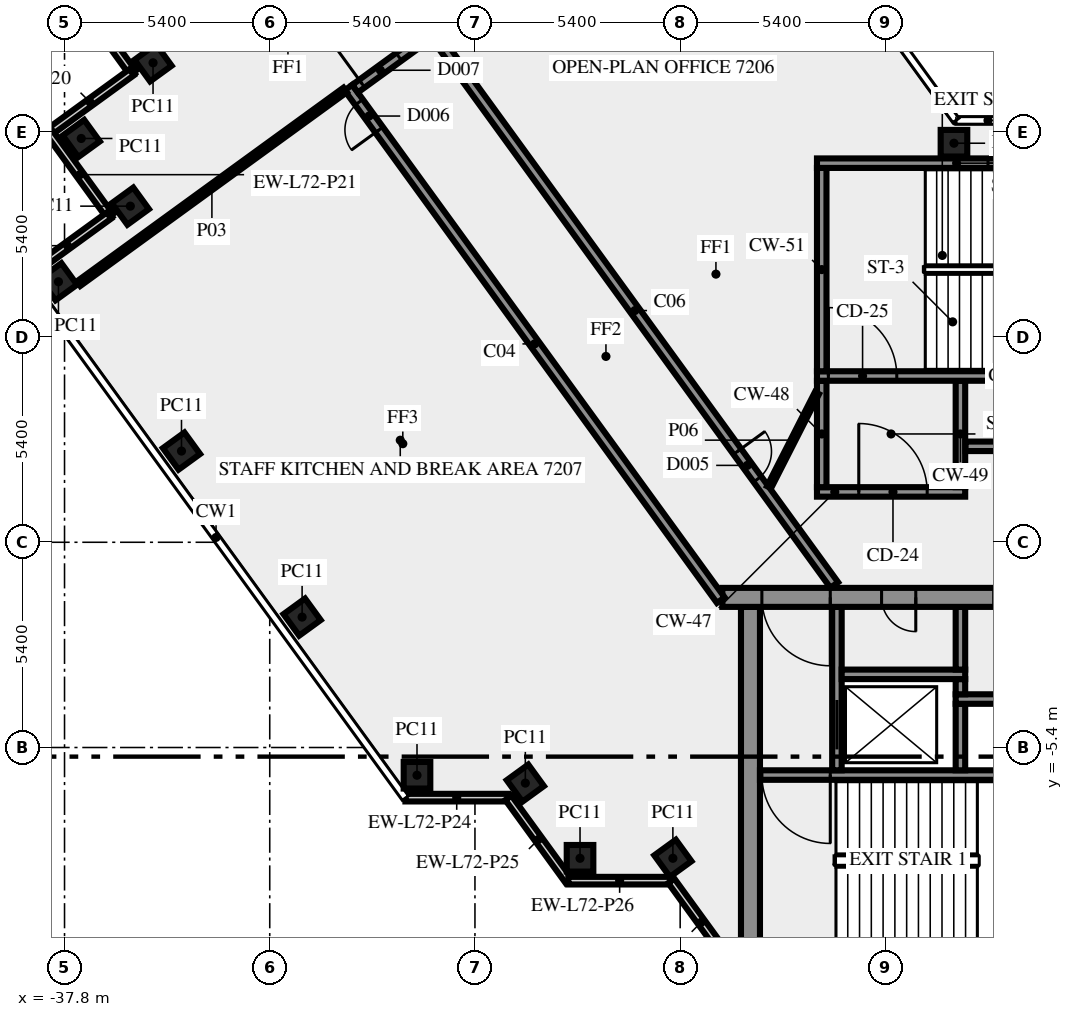
"""IFC4 building model, lengths in metres.
Left out: names, types, materials, properties, quantities, classifications, styles, units other than length and angle.
Written with IfcOpenShell. Run it as: python <this file> out.ifc"""

import sys

from ifc_helpers import new_model, si_unit, direction, frame, frame_2d, origin, origin_2d, place, context, subcontext, project, spatial, rectangle, extrude, element, fill, save


model = new_model("IFC4")
c1 = context("Model", 3, precision=1e-05, world=origin(), true_north=direction((0.0, 1.0)))
c2 = subcontext(c1, "Body", "Model", "MODEL_VIEW")
j1 = project(units=[si_unit("LENGTHUNIT", "METRE"), si_unit("PLANEANGLEUNIT", "RADIAN")], contexts=[c1])
p1 = place(None, origin())
s1 = spatial("IfcSite", under=j1, at=p1, CompositionType="ELEMENT")
p2 = place(p1, origin())
s2 = spatial("IfcBuilding", under=s1, at=p2, CompositionType="ELEMENT")
p3 = place(p2, frame((0.0, 0.0, 311.0)))
s3 = spatial("IfcBuildingStorey", under=s2, at=p3, CompositionType="ELEMENT", Elevation=311.0)
for number, where, z_axis, x_axis in (
    (1, (-35.471, 12.616, 0.0), (0.0, 0.0, 1.0), (-0.809, -0.588, 0.0)),
    (2, (-37.36, 10.625, 0.0), (0.0, 0.0, 1.0), (0.588, -0.809, 0.0)),
    (3, (-36.068, 8.844, 0.0), (0.0, 0.0, 1.0), (0.588, -0.809, 0.0)),
    (4, (-37.96, 6.855, 0.0), (0.0, 0.0, 1.0), (0.588, -0.809, 0.0)),
    (5, (-34.722, 2.4, 0.0), (0.0, 0.0, 1.0), (0.588, -0.809, 0.0)),
    (6, (-31.548, -1.969, 0.0), (0.0, 0.0, 1.0), (0.588, -0.809, 0.0)),
    (7, (-28.525, -6.13, 0.0), (0.0, 0.0, 1.0), (1.0, 0.0, 0.0)),
    (8, (-25.674, -6.337, 0.0), (0.0, 0.0, 1.0), (0.588, -0.809, 0.0)),
    (9, (-24.235, -8.315, 0.0), (0.0, 0.0, 1.0), (1.0, 0.0, 0.0)),
    (10, (-21.792, -8.315, 0.0), (0.0, 0.0, 1.0), (0.588, -0.809, 0.0)),
    (11, (-14.395, 10.5, 0.0), (0.0, 0.0, 1.0), (-1.0, 0.0, 0.0)),
):
    element("IfcColumn", number, at=place(p3, frame(where, z_axis=z_axis, x_axis=x_axis)), inside=s3, PredefinedType="COLUMN", context=c2, shape_type="SweptSolid", body=[
        extrude(rectangle(XDim=0.7, YDim=0.7, at=origin_2d()), origin(), (0.0, 0.0, 1.0), 3.65),
    ])
for number, where, z_axis, x_axis in (
    (12, (-37.592, 14.536, 0.0), (0.0, 0.0, 1.0), (0.588, -0.809, 0.0)),
    (13, (-36.032, 12.369, 0.0), (0.0, 0.0, 1.0), (-0.809, -0.588, 0.0)),
    (14, (-38.189, 10.765, 0.0), (0.0, 0.0, 1.0), (0.588, -0.809, 0.0)),
    (15, (-36.629, 8.597, 0.0), (0.0, 0.0, 1.0), (-0.809, -0.588, 0.0)),
    (16, (-28.83, -6.719, 0.0), (0.0, 0.0, 1.0), (1.0, 0.0, 0.0)),
):
    element("IfcWall", number, at=place(p3, frame(where, z_axis=z_axis, x_axis=x_axis)), inside=s3, PredefinedType="SOLIDWALL", context=c2, shape_type="SweptSolid", body=[
        extrude(rectangle(XDim=2.7, YDim=0.2, at=frame_2d((1.35, 0.0))), origin(), (0.0, 0.0, 1.0), 3.65),
    ])
p4 = place(p3, frame((-26.12, -6.724, 0.0), z_axis=(0.0, 0.0, 1.0), x_axis=(0.587720002413, -0.809064397168, 0.0)))
e17 = element("IfcWall", 17, at=p4, inside=s3, PredefinedType="SOLIDWALL", context=c2, shape_type="SweptSolid", body=[
    extrude(rectangle(XDim=2.7, YDim=0.2, at=frame_2d((1.35, 0.0))), origin(), (0.0, 0.0, 1.0), 3.65),
])
p5 = place(p3, frame((-24.543, -8.904, 0.0), z_axis=(0.0, 0.0, 1.0), x_axis=(1.0, 0.0, 0.0)))
e18 = element("IfcWall", 18, at=p5, inside=s3, PredefinedType="SOLIDWALL", context=c2, shape_type="SweptSolid", body=[
    extrude(rectangle(XDim=2.7, YDim=0.2, at=frame_2d((1.35, 0.0))), origin(), (0.0, 0.0, 1.0), 3.65),
])
p6 = place(p3, frame((-21.833, -8.909, 0.0), z_axis=(0.0, 0.0, 1.0), x_axis=(0.587766567315, -0.809030569476, 0.0)))
e19 = element("IfcWall", 19, at=p6, inside=s3, PredefinedType="SOLIDWALL", context=c2, shape_type="SweptSolid", body=[
    extrude(rectangle(XDim=2.688, YDim=0.2, at=frame_2d((1.344, 0.0))), origin(), (0.0, 0.0, 1.0), 3.65),
])
p7 = place(p3, frame((-19.75, -10.5, 0.0), z_axis=(0.0, 0.0, 1.0), x_axis=(0.0, 1.0, 0.0)))
e20 = element("IfcWall", 20, at=p7, inside=s3, PredefinedType="SHEAR", context=c2, shape_type="SweptSolid", body=[
    extrude(rectangle(XDim=8.8, YDim=0.5, at=frame_2d((4.4, 0.0))), origin(), (0.0, 0.0, 1.0), 3.65),
])
p8 = place(p3, frame((-11.45, -6.125, 0.0), z_axis=(0.0, 0.0, 1.0), x_axis=(-1.0, 0.0, 0.0)))
e21 = element("IfcWall", 21, at=p8, inside=s3, PredefinedType="SHEAR", context=c2, shape_type="SweptSolid", body=[
    extrude(rectangle(XDim=8.05, YDim=0.25, at=frame_2d((4.025, 0.0))), origin(), (0.0, 0.0, 1.0), 3.65),
])
p9 = place(p8, frame((6.2, 0.0, 0.0)))
e22 = element("IfcOpeningElement", 22, at=p9, cuts=e21, PredefinedType="OPENING", context=c2, shape_type="SweptSolid", body=[
    extrude(rectangle(XDim=1.8, YDim=2.1, at=frame_2d((0.9, 1.05))), frame((0.0, 0.135, 0.0), z_axis=(0.0, -1.0, 0.0), x_axis=(1.0, 0.0, 0.0)), (0.0, 0.0, 1.0), 0.27),
])
p10 = place(p3, frame((-17.475, -6.0, 0.0), z_axis=(0.0, 0.0, 1.0), x_axis=(0.0, 1.0, 0.0)))
e23 = element("IfcWall", 23, at=p10, inside=s3, PredefinedType="SHEAR", context=c2, shape_type="SweptSolid", body=[
    extrude(rectangle(XDim=4.3, YDim=0.25, at=frame_2d((2.15, 0.0))), origin(), (0.0, 0.0, 1.0), 3.65),
])
p11 = place(p10, frame((0.55, 0.0, 0.0)))
e24 = element("IfcOpeningElement", 24, at=p11, cuts=e23, PredefinedType="OPENING", context=c2, shape_type="SweptSolid", body=[
    extrude(rectangle(XDim=1.3, YDim=2.1, at=frame_2d((0.65, 1.05))), frame((0.0, 0.135, 0.0), z_axis=(0.0, -1.0, 0.0), x_axis=(1.0, 0.0, 0.0)), (0.0, 0.0, 1.0), 0.27),
])
p12 = place(p3, frame((-14.225, -6.0, 0.0), z_axis=(0.0, 0.0, 1.0), x_axis=(0.0, 1.0, 0.0)))
e25 = element("IfcWall", 25, at=p12, inside=s3, PredefinedType="SHEAR", context=c2, shape_type="SweptSolid", body=[
    extrude(rectangle(XDim=1.75, YDim=0.25, at=frame_2d((0.875, 0.0))), origin(), (0.0, 0.0, 1.0), 3.65),
])
p13 = place(p3, frame((-14.35, -4.125, 0.0), z_axis=(0.0, 0.0, 1.0), x_axis=(1.0, 0.0, 0.0)))
e26 = element("IfcWall", 26, at=p13, inside=s3, PredefinedType="SHEAR", context=c2, shape_type="SweptSolid", body=[
    extrude(rectangle(XDim=10.4, YDim=0.25, at=frame_2d((5.2, 0.0))), origin(), (0.0, 0.0, 1.0), 3.65),
])
p14 = place(p13, frame((4.75, 0.0, 0.0)))
e27 = element("IfcOpeningElement", 27, at=p14, cuts=e26, PredefinedType="OPENING", context=c2, shape_type="SweptSolid", body=[
    extrude(rectangle(XDim=1.1, YDim=2.1, at=frame_2d((0.55, 1.05))), frame((0.0, 0.135, 0.0), z_axis=(0.0, -1.0, 0.0), x_axis=(1.0, 0.0, 0.0)), (0.0, 0.0, 1.0), 0.27),
])
p15 = place(p13, frame((7.25, 0.0, 0.0)))
e28 = element("IfcOpeningElement", 28, at=p15, cuts=e26, PredefinedType="OPENING", context=c2, shape_type="SweptSolid", body=[
    extrude(rectangle(XDim=1.1, YDim=2.1, at=frame_2d((0.55, 1.05))), frame((0.0, 0.135, 0.0), z_axis=(0.0, -1.0, 0.0), x_axis=(1.0, 0.0, 0.0)), (0.0, 0.0, 1.0), 0.27),
])
p16 = place(p3, frame((-14.225, -4.0, 0.0), z_axis=(0.0, 0.0, 1.0), x_axis=(0.0, 1.0, 0.0)))
e29 = element("IfcWall", 29, at=p16, inside=s3, PredefinedType="SHEAR", context=c2, shape_type="SweptSolid", body=[
    extrude(rectangle(XDim=0.4, YDim=0.25, at=frame_2d((0.2, 0.0))), origin(), (0.0, 0.0, 1.0), 3.65),
])
p17 = place(p3, frame((-17.35, -3.475, 0.0), z_axis=(0.0, 0.0, 1.0), x_axis=(1.0, 0.0, 0.0)))
e30 = element("IfcWall", 30, at=p17, inside=s3, PredefinedType="SHEAR", context=c2, shape_type="SweptSolid", body=[
    extrude(rectangle(XDim=3.25, YDim=0.25, at=frame_2d((1.625, 0.0))), origin(), (0.0, 0.0, 1.0), 3.65),
])
p18 = place(p3, frame((-14.225, -3.35, 0.0), z_axis=(0.0, 0.0, 1.0), x_axis=(0.0, 1.0, 0.0)))
e31 = element("IfcWall", 31, at=p18, inside=s3, PredefinedType="SHEAR", context=c2, shape_type="SweptSolid", body=[
    extrude(rectangle(XDim=1.65, YDim=0.25, at=frame_2d((0.825, 0.0))), origin(), (0.0, 0.0, 1.0), 3.65),
])
p19 = place(p3, frame((20.49, -1.45, 0.0), z_axis=(0.0, 0.0, 1.0), x_axis=(-1.0, 0.0, 0.0)))
e32 = element("IfcWall", 32, at=p19, inside=s3, PredefinedType="SHEAR", context=c2, shape_type="SweptSolid", body=[
    extrude(rectangle(XDim=40.98, YDim=0.5, at=frame_2d((20.49, 0.0))), origin(), (0.0, 0.0, 1.0), 3.65),
])
p20 = place(p19, frame((38.14, 0.0, 0.0)))
e33 = element("IfcOpeningElement", 33, at=p20, cuts=e32, PredefinedType="OPENING", context=c2, shape_type="SweptSolid", body=[
    extrude(rectangle(XDim=1.8, YDim=2.1, at=frame_2d((0.9, 1.05))), frame((0.0, 0.26, 0.0), z_axis=(0.0, -1.0, 0.0), x_axis=(1.0, 0.0, 0.0)), (0.0, 0.0, 1.0), 0.52),
])
p21 = place(p19, frame((35.89, 0.0, 0.0)))
e34 = element("IfcOpeningElement", 34, at=p21, cuts=e32, PredefinedType="OPENING", context=c2, shape_type="SweptSolid", body=[
    extrude(rectangle(XDim=0.9, YDim=2.1, at=frame_2d((0.45, 1.05))), frame((0.0, 0.26, 0.0), z_axis=(0.0, -1.0, 0.0), x_axis=(1.0, 0.0, 0.0)), (0.0, 0.0, 1.0), 0.52),
])
p22 = place(p19, frame((32.94, 0.0, 0.0)))
e35 = element("IfcOpeningElement", 35, at=p22, cuts=e32, PredefinedType="OPENING", context=c2, shape_type="SweptSolid", body=[
    extrude(rectangle(XDim=0.9, YDim=2.1, at=frame_2d((0.45, 1.05))), frame((0.0, 0.26, 0.0), z_axis=(0.0, -1.0, 0.0), x_axis=(1.0, 0.0, 0.0)), (0.0, 0.0, 1.0), 0.52),
])
p23 = place(p19, frame((31.015, 0.0, 0.0)))
e36 = element("IfcOpeningElement", 36, at=p23, cuts=e32, PredefinedType="OPENING", context=c2, shape_type="SweptSolid", body=[
    extrude(rectangle(XDim=0.8, YDim=2.1, at=frame_2d((0.4, 1.05))), frame((0.0, 0.26, 0.0), z_axis=(0.0, -1.0, 0.0), x_axis=(1.0, 0.0, 0.0)), (0.0, 0.0, 1.0), 0.52),
])
p24 = place(p19, frame((24.765, 0.0, 0.0)))
e37 = element("IfcOpeningElement", 37, at=p24, cuts=e32, PredefinedType="OPENING", context=c2, shape_type="SweptSolid", body=[
    extrude(rectangle(XDim=0.8, YDim=2.1, at=frame_2d((0.4, 1.05))), frame((0.0, 0.26, 0.0), z_axis=(0.0, -1.0, 0.0), x_axis=(1.0, 0.0, 0.0)), (0.0, 0.0, 1.0), 0.52),
])
p25 = place(p19, frame((21.765, 0.0, 0.0)))
e38 = element("IfcOpeningElement", 38, at=p25, cuts=e32, PredefinedType="OPENING", context=c2, shape_type="SweptSolid", body=[
    extrude(rectangle(XDim=2.0, YDim=2.1, at=frame_2d((1.0, 1.05))), frame((0.0, 0.26, 0.0), z_axis=(0.0, -1.0, 0.0), x_axis=(1.0, 0.0, 0.0)), (0.0, 0.0, 1.0), 0.52),
])
p26 = place(p19, frame((12.24, 0.0, 0.0)))
e39 = element("IfcOpeningElement", 39, at=p26, cuts=e32, PredefinedType="OPENING", context=c2, shape_type="SweptSolid", body=[
    extrude(rectangle(XDim=0.9, YDim=2.1, at=frame_2d((0.45, 1.05))), frame((0.0, 0.26, 0.0), z_axis=(0.0, -1.0, 0.0), x_axis=(1.0, 0.0, 0.0)), (0.0, 0.0, 1.0), 0.52),
])
p27 = place(p19, frame((7.14, 0.0, 0.0)))
e40 = element("IfcOpeningElement", 40, at=p27, cuts=e32, PredefinedType="OPENING", context=c2, shape_type="SweptSolid", body=[
    extrude(rectangle(XDim=0.9, YDim=2.1, at=frame_2d((0.45, 1.05))), frame((0.0, 0.26, 0.0), z_axis=(0.0, -1.0, 0.0), x_axis=(1.0, 0.0, 0.0)), (0.0, 0.0, 1.0), 0.52),
])
p28 = place(p19, frame((5.028, 0.0, 0.0)))
e41 = element("IfcOpeningElement", 41, at=p28, cuts=e32, PredefinedType="OPENING", context=c2, shape_type="SweptSolid", body=[
    extrude(rectangle(XDim=0.8, YDim=2.1, at=frame_2d((0.4, 1.05))), frame((0.0, 0.26, 0.0), z_axis=(0.0, -1.0, 0.0), x_axis=(1.0, 0.0, 0.0)), (0.0, 0.0, 1.0), 0.52),
])
p29 = place(p19, frame((3.452, 0.0, 0.0)))
e42 = element("IfcOpeningElement", 42, at=p29, cuts=e32, PredefinedType="OPENING", context=c2, shape_type="SweptSolid", body=[
    extrude(rectangle(XDim=0.8, YDim=2.1, at=frame_2d((0.4, 1.05))), frame((0.0, 0.26, 0.0), z_axis=(0.0, -1.0, 0.0), x_axis=(1.0, 0.0, 0.0)), (0.0, 0.0, 1.0), 0.52),
])
p30 = place(p19, frame((1.04, 0.0, 0.0)))
e43 = element("IfcOpeningElement", 43, at=p30, cuts=e32, PredefinedType="OPENING", context=c2, shape_type="SweptSolid", body=[
    extrude(rectangle(XDim=1.8, YDim=2.1, at=frame_2d((0.9, 1.05))), frame((0.0, 0.26, 0.0), z_axis=(0.0, -1.0, 0.0), x_axis=(1.0, 0.0, 0.0)), (0.0, 0.0, 1.0), 0.52),
])
p31 = place(p3, frame((-18.0, 1.325, 0.0), z_axis=(0.0, 0.0, 1.0), x_axis=(1.0, 0.0, 0.0)))
e44 = element("IfcWall", 44, at=p31, inside=s3, PredefinedType="SHEAR", context=c2, shape_type="SweptSolid", body=[
    extrude(rectangle(XDim=3.9, YDim=0.25, at=frame_2d((1.95, 0.0))), origin(), (0.0, 0.0, 1.0), 3.65),
])
p32 = place(p31, frame((1.1, 0.0, 0.0)))
e45 = element("IfcOpeningElement", 45, at=p32, cuts=e44, PredefinedType="OPENING", context=c2, shape_type="SweptSolid", body=[
    extrude(rectangle(XDim=1.8, YDim=2.1, at=frame_2d((0.9, 1.05))), frame((0.0, 0.135, 0.0), z_axis=(0.0, -1.0, 0.0), x_axis=(1.0, 0.0, 0.0)), (0.0, 0.0, 1.0), 0.27),
])
for number, where, z_axis, x_axis in (
    (46, (-17.875, 1.45, 0.0), (0.0, 0.0, 1.0), (0.0, 1.0, 0.0)),
    (47, (-14.225, 1.45, 0.0), (0.0, 0.0, 1.0), (0.0, 1.0, 0.0)),
):
    element("IfcWall", number, at=place(p3, frame(where, z_axis=z_axis, x_axis=x_axis)), inside=s3, PredefinedType="SHEAR", context=c2, shape_type="SweptSolid", body=[
        extrude(rectangle(XDim=2.8, YDim=0.25, at=frame_2d((1.4, 0.0))), origin(), (0.0, 0.0, 1.0), 3.65),
    ])
p33 = place(p3, frame((-18.0, 4.375, 0.0), z_axis=(0.0, 0.0, 1.0), x_axis=(1.0, 0.0, 0.0)))
e48 = element("IfcWall", 48, at=p33, inside=s3, PredefinedType="SHEAR", context=c2, shape_type="SweptSolid", body=[
    extrude(rectangle(XDim=10.5, YDim=0.25, at=frame_2d((5.25, 0.0))), origin(), (0.0, 0.0, 1.0), 3.65),
])
p34 = place(p33, frame((0.3, 0.0, 0.0)))
e49 = element("IfcOpeningElement", 49, at=p34, cuts=e48, PredefinedType="OPENING", context=c2, shape_type="SweptSolid", body=[
    extrude(rectangle(XDim=1.8, YDim=2.1, at=frame_2d((0.9, 1.05))), frame((0.0, 0.135, 0.0), z_axis=(0.0, -1.0, 0.0), x_axis=(1.0, 0.0, 0.0)), (0.0, 0.0, 1.0), 0.27),
])
p35 = place(p3, frame((-17.875, 4.5, 0.0), z_axis=(0.0, 0.0, 1.0), x_axis=(0.0, 1.0, 0.0)))
e50 = element("IfcWall", 50, at=p35, inside=s3, PredefinedType="SHEAR", context=c2, shape_type="SweptSolid", body=[
    extrude(rectangle(XDim=5.35, YDim=0.25, at=frame_2d((2.675, 0.0))), origin(), (0.0, 0.0, 1.0), 3.65),
])
p36 = place(p3, frame((-18.0, 9.975, 0.0), z_axis=(0.0, 0.0, 1.0), x_axis=(1.0, 0.0, 0.0)))
e51 = element("IfcWall", 51, at=p36, inside=s3, PredefinedType="SHEAR", context=c2, shape_type="SweptSolid", body=[
    extrude(rectangle(XDim=10.5, YDim=0.25, at=frame_2d((5.25, 0.0))), origin(), (0.0, 0.0, 1.0), 3.65),
])
p37 = place(p36, frame((4.5, 0.0, 1.0)))
e52 = element("IfcOpeningElement", 52, at=p37, cuts=e51, PredefinedType="OPENING", context=c2, shape_type="SweptSolid", body=[
    extrude(rectangle(XDim=1.2, YDim=1.2, at=frame_2d((0.6, 0.6))), frame((0.0, 0.135, 0.0), z_axis=(0.0, -1.0, 0.0), x_axis=(1.0, 0.0, 0.0)), (0.0, 0.0, 1.0), 0.27),
])
p38 = place(p3, frame((-20.531, -1.523, 0.0), z_axis=(0.0, 0.0, 1.0), x_axis=(-0.587785867777, 0.809016547199, 0.0)))
e53 = element("IfcWall", 53, at=p38, inside=s3, PredefinedType="SOLIDWALL", context=c2, shape_type="SweptSolid", body=[
    extrude(rectangle(XDim=16.67, YDim=0.25, at=frame_2d((8.335, 0.0))), origin(), (0.0, 0.0, 1.0), 3.65),
])
p39 = place(p38, frame((15.296, 0.0, 0.0)))
e54 = element("IfcOpeningElement", 54, at=p39, cuts=e53, PredefinedType="OPENING", context=c2, shape_type="SweptSolid", body=[
    extrude(rectangle(XDim=0.9, YDim=2.1, at=frame_2d((0.45, 1.05))), frame((0.0, 0.135, 0.0), z_axis=(0.0, -1.0, 0.0), x_axis=(1.0, 0.0, 0.0)), (0.0, 0.0, 1.0), 0.27),
])
p40 = place(p3, frame((-30.155, 11.936, 0.0), z_axis=(0.0, 0.0, 1.0), x_axis=(0.809038743598, 0.587755315891, 0.0)))
e55 = element("IfcWall", 55, at=p40, inside=s3, PredefinedType="SOLIDWALL", context=c2, shape_type="SweptSolid", body=[
    extrude(rectangle(XDim=2.65, YDim=0.25, at=frame_2d((1.325, 0.0))), origin(), (0.0, 0.0, 1.0), 3.65),
])
p41 = place(p40, frame((0.225, 0.0, 0.0)))
e56 = element("IfcOpeningElement", 56, at=p41, cuts=e55, PredefinedType="OPENING", context=c2, shape_type="SweptSolid", body=[
    extrude(rectangle(XDim=1.2, YDim=2.1, at=frame_2d((0.6, 1.05))), frame((0.0, 0.135, 0.0), z_axis=(0.0, -1.0, 0.0), x_axis=(1.0, 0.0, 0.0)), (0.0, 0.0, 1.0), 0.27),
])
p42 = place(p3, frame((-28.039, 13.319, 0.0), z_axis=(0.0, 0.0, 1.0), x_axis=(0.587791911753, -0.809012155952, 0.0)))
e57 = element("IfcWall", 57, at=p42, inside=s3, PredefinedType="SOLIDWALL", context=c2, shape_type="SweptSolid", body=[
    extrude(rectangle(XDim=17.853, YDim=0.25, at=frame_2d((8.927, 0.0))), origin(), (0.0, 0.0, 1.0), 3.65),
])
p43 = place(p42, frame((13.512, 0.0, 0.0)))
e58 = element("IfcOpeningElement", 58, at=p43, cuts=e57, PredefinedType="OPENING", context=c2, shape_type="SweptSolid", body=[
    extrude(rectangle(XDim=0.9, YDim=2.1, at=frame_2d((0.45, 1.05))), frame((0.0, 0.135, 0.0), z_axis=(0.0, -1.0, 0.0), x_axis=(1.0, 0.0, 0.0)), (0.0, 0.0, 1.0), 0.27),
])
p44 = place(p3, frame((-14.09, 2.525, 0.0), z_axis=(0.0, 0.0, 1.0), x_axis=(1.0, 0.0, 0.0)))
e59 = element("IfcWall", 59, at=p44, inside=s3, PredefinedType="SOLIDWALL", context=c2, shape_type="SweptSolid", body=[
    extrude(rectangle(XDim=8.84, YDim=0.25, at=frame_2d((4.42, 0.0))), origin(), (0.0, 0.0, 1.0), 3.65),
])
p45 = place(p3, frame((-37.429, 6.805, 0.0), z_axis=(0.0, 0.0, 1.0), x_axis=(0.809020922653, 0.587779845444, 0.0)))
e60 = element("IfcWall", 60, at=p45, inside=s3, PredefinedType="PARTITIONING", context=c2, shape_type="SweptSolid", body=[
    extrude(rectangle(XDim=8.67, YDim=0.15, at=frame_2d((4.335, 0.0))), origin(), (0.0, 0.0, 1.0), 3.65),
])
p46 = place(p3, frame((-19.261, 1.45, 0.0), z_axis=(0.0, 0.0, 1.0), x_axis=(0.453950796792, 0.891026752736, 0.0)))
e61 = element("IfcWall", 61, at=p46, inside=s3, PredefinedType="PARTITIONING", context=c2, shape_type="SweptSolid", body=[
    extrude(rectangle(XDim=2.778, YDim=0.12, at=frame_2d((1.389, 0.0))), origin(), (0.0, 0.0, 1.0), 3.65),
])
p47 = place(p9, origin())
e62 = element("IfcDoor", 62, at=p47, inside=s3, OperationType="DOUBLE_DOOR_SINGLE_SWING", PredefinedType="DOOR", context=c2, shape_type="SweptSolid", body=[
    extrude(rectangle(XDim=1.8, YDim=2.1, at=frame_2d((0.9, 1.05))), frame((0.0, 0.025, 0.0), z_axis=(0.0, -1.0, 0.0), x_axis=(1.0, 0.0, 0.0)), (0.0, 0.0, 1.0), 0.05),
])
fill(e22, e62)
p48 = place(p11, origin())
e63 = element("IfcDoor", 63, at=p48, inside=s3, OperationType="DOUBLE_DOOR_SLIDING", PredefinedType="DOOR", context=c2, shape_type="SweptSolid", body=[
    extrude(rectangle(XDim=1.3, YDim=2.1, at=frame_2d((0.65, 1.05))), frame((0.0, 0.025, 0.0), z_axis=(0.0, -1.0, 0.0), x_axis=(1.0, 0.0, 0.0)), (0.0, 0.0, 1.0), 0.05),
])
fill(e24, e63)
p49 = place(p20, origin())
e64 = element("IfcDoor", 64, at=p49, inside=s3, OperationType="DOUBLE_DOOR_SINGLE_SWING", PredefinedType="DOOR", context=c2, shape_type="SweptSolid", body=[
    extrude(rectangle(XDim=1.8, YDim=2.1, at=frame_2d((0.9, 1.05))), frame((0.0, 0.025, 0.0), z_axis=(0.0, -1.0, 0.0), x_axis=(1.0, 0.0, 0.0)), (0.0, 0.0, 1.0), 0.05),
])
fill(e33, e64)
p50 = place(p21, origin())
e65 = element("IfcDoor", 65, at=p50, inside=s3, OperationType="SINGLE_SWING_RIGHT", PredefinedType="DOOR", context=c2, shape_type="SweptSolid", body=[
    extrude(rectangle(XDim=0.9, YDim=2.1, at=frame_2d((0.45, 1.05))), frame((0.0, 0.025, 0.0), z_axis=(0.0, -1.0, 0.0), x_axis=(1.0, 0.0, 0.0)), (0.0, 0.0, 1.0), 0.05),
])
fill(e34, e65)
p51 = place(p32, origin())
e66 = element("IfcDoor", 66, at=p51, inside=s3, OperationType="DOUBLE_DOOR_SINGLE_SWING", PredefinedType="DOOR", context=c2, shape_type="SweptSolid", body=[
    extrude(rectangle(XDim=1.8, YDim=2.1, at=frame_2d((0.9, 1.05))), frame((0.0, 0.025, 0.0), z_axis=(0.0, -1.0, 0.0), x_axis=(1.0, 0.0, 0.0)), (0.0, 0.0, 1.0), 0.05),
])
fill(e45, e66)
p52 = place(p34, origin())
e67 = element("IfcDoor", 67, at=p52, inside=s3, OperationType="DOUBLE_DOOR_SINGLE_SWING", PredefinedType="DOOR", context=c2, shape_type="SweptSolid", body=[
    extrude(rectangle(XDim=1.8, YDim=2.1, at=frame_2d((0.9, 1.05))), frame((0.0, 0.025, 0.0), z_axis=(0.0, -1.0, 0.0), x_axis=(1.0, 0.0, 0.0)), (0.0, 0.0, 1.0), 0.05),
])
fill(e49, e67)
p53 = place(p37, origin())
e68 = element("IfcWindow", 68, at=p53, inside=s3, PartitioningType="SINGLE_PANEL", PredefinedType="WINDOW", context=c2, shape_type="SweptSolid", body=[
    extrude(rectangle(XDim=1.2, YDim=1.2, at=frame_2d((0.6, 0.6))), frame((0.0, 0.03, 0.0), z_axis=(0.0, -1.0, 0.0), x_axis=(1.0, 0.0, 0.0)), (0.0, 0.0, 1.0), 0.06),
])
fill(e52, e68)
p54 = place(p43, origin())
e69 = element("IfcDoor", 69, at=p54, inside=s3, OperationType="SINGLE_SWING_RIGHT", PredefinedType="DOOR", context=c2, shape_type="SweptSolid", body=[
    extrude(rectangle(XDim=0.9, YDim=2.1, at=frame_2d((0.45, 1.05))), frame((0.0, 0.025, 0.0), z_axis=(0.0, -1.0, 0.0), x_axis=(1.0, 0.0, 0.0)), (0.0, 0.0, 1.0), 0.05),
])
fill(e58, e69)
p55 = place(p41, origin())
e70 = element("IfcDoor", 70, at=p55, inside=s3, OperationType="SINGLE_SWING_LEFT", PredefinedType="DOOR", context=c2, shape_type="SweptSolid", body=[
    extrude(rectangle(XDim=1.2, YDim=2.1, at=frame_2d((0.6, 1.05))), frame((0.0, 0.025, 0.0), z_axis=(0.0, -1.0, 0.0), x_axis=(1.0, 0.0, 0.0)), (0.0, 0.0, 1.0), 0.05),
])
fill(e56, e70)
p56 = place(p39, origin())
e71 = element("IfcDoor", 71, at=p56, inside=s3, OperationType="SINGLE_SWING_RIGHT", PredefinedType="DOOR", context=c2, shape_type="SweptSolid", body=[
    extrude(rectangle(XDim=0.9, YDim=2.1, at=frame_2d((0.45, 1.05))), frame((0.0, 0.025, 0.0), z_axis=(0.0, -1.0, 0.0), x_axis=(1.0, 0.0, 0.0)), (0.0, 0.0, 1.0), 0.05),
])
fill(e54, e71)
save(model, sys.argv[1])
